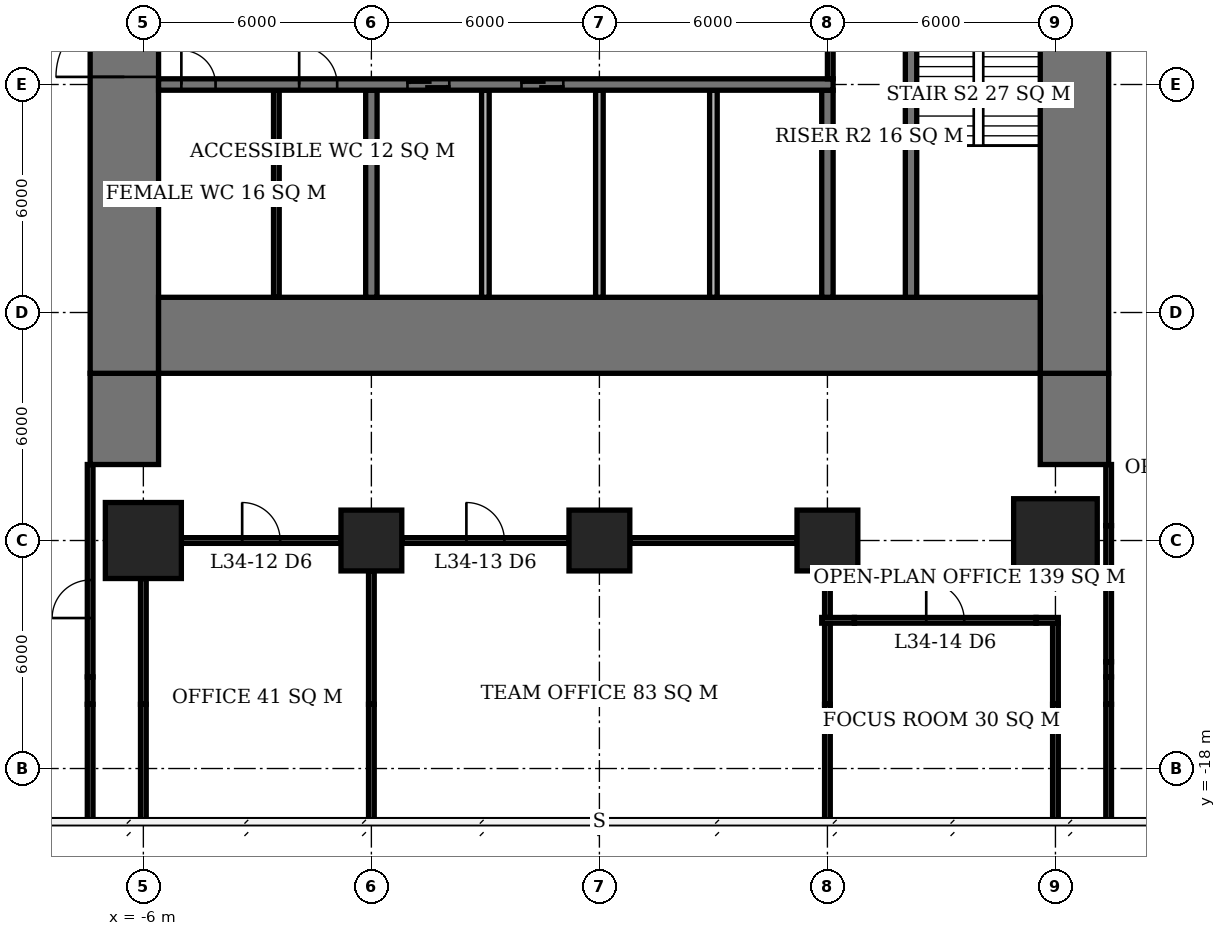
"""IFC4 building model, lengths in metres.
Left out: names, types, materials, properties, quantities, classifications, styles, units other than length and angle.
Written with IfcOpenShell. Run it as: python <this file> out.ifc"""

import sys

from ifc_helpers import new_model, si_unit, direction, frame, frame_2d, origin, origin_2d, place, context, subcontext, project, spatial, rectangle, extrude, element, fill, save


model = new_model("IFC4")
c1 = context("Model", 3, precision=1e-05, world=origin(), true_north=direction((0.0, 1.0)))
c2 = subcontext(c1, "Body", "Model", "MODEL_VIEW")
j1 = project(units=[si_unit("LENGTHUNIT", "METRE"), si_unit("PLANEANGLEUNIT", "RADIAN")], contexts=[c1])
p1 = place(None, origin())
s1 = spatial("IfcSite", under=j1, at=p1, CompositionType="ELEMENT")
p2 = place(p1, origin())
s2 = spatial("IfcBuilding", under=s1, at=p2, CompositionType="ELEMENT")
p3 = place(p2, frame((0.0, 0.0, 140.6)))
s3 = spatial("IfcBuildingStorey", under=s2, at=p3, CompositionType="ELEMENT", Elevation=140.6)
p4 = place(p3, frame((-6.0, -12.0, 0.0), z_axis=(0.0, 0.0, 1.0), x_axis=(1.0, 0.0, 0.0)))
e1 = element("IfcColumn", 1, at=p4, inside=s3, PredefinedType="COLUMN", context=c2, shape_type="SweptSolid", body=[
    extrude(rectangle(XDim=2.0, YDim=2.0, at=origin_2d()), origin(), (0.0, 0.0, 1.0), 3.9),
])
for number, where, z_axis, x_axis in (
    (2, (0.0, -12.0, 0.0), (0.0, 0.0, 1.0), (1.0, 0.0, 0.0)),
    (3, (6.0, -12.0, 0.0), (0.0, 0.0, 1.0), (1.0, 0.0, 0.0)),
    (4, (12.0, -12.0, 0.0), (0.0, 0.0, 1.0), (1.0, 0.0, 0.0)),
):
    element("IfcColumn", number, at=place(p3, frame(where, z_axis=z_axis, x_axis=x_axis)), inside=s3, PredefinedType="COLUMN", context=c2, shape_type="SweptSolid", body=[
        extrude(rectangle(XDim=1.6, YDim=1.6, at=origin_2d()), origin(), (0.0, 0.0, 1.0), 3.9),
    ])
p5 = place(p3, frame((18.0, -12.0, 0.0), z_axis=(0.0, 0.0, 1.0), x_axis=(1.0, 0.0, 0.0)))
e5 = element("IfcColumn", 5, at=p5, inside=s3, PredefinedType="COLUMN", context=c2, shape_type="SweptSolid", body=[
    extrude(rectangle(XDim=2.2, YDim=2.2, at=origin_2d()), origin(), (0.0, 0.0, 1.0), 3.9),
])
p6 = place(p3, frame((-5.6, -6.6, 0.0), z_axis=(0.0, 0.0, 1.0), x_axis=(1.0, 0.0, 0.0)))
e6 = element("IfcWall", 6, at=p6, inside=s3, PredefinedType="SHEAR", context=c2, shape_type="SweptSolid", body=[
    extrude(rectangle(XDim=23.2, YDim=2.0, at=frame_2d((11.6, 0.0))), origin(), (0.0, 0.0, 1.0), 3.9),
])
p7 = place(p3, frame((-6.5, -7.6, 0.0), z_axis=(0.0, 0.0, 1.0), x_axis=(0.0, 1.0, 0.0)))
e7 = element("IfcWall", 7, at=p7, inside=s3, PredefinedType="SHEAR", context=c2, shape_type="SweptSolid", body=[
    extrude(rectangle(XDim=21.2, YDim=1.8, at=frame_2d((10.6, 0.0))), origin(), (0.0, 0.0, 1.0), 3.9),
])
p8 = place(p7, frame((7.8, 0.0, 0.0)))
e8 = element("IfcOpeningElement", 8, at=p8, cuts=e7, PredefinedType="OPENING", context=c2, shape_type="SweptSolid", body=[
    extrude(rectangle(XDim=1.8, YDim=2.4, at=frame_2d((0.9, 1.2))), frame((0.0, 0.91, 0.0), z_axis=(0.0, -1.0, 0.0), x_axis=(1.0, 0.0, 0.0)), (0.0, 0.0, 1.0), 1.82),
])
p9 = place(p3, frame((18.5, -7.6, 0.0), z_axis=(0.0, 0.0, 1.0), x_axis=(0.0, 1.0, 0.0)))
e9 = element("IfcWall", 9, at=p9, inside=s3, PredefinedType="SHEAR", context=c2, shape_type="SweptSolid", body=[
    extrude(rectangle(XDim=21.2, YDim=1.8, at=frame_2d((10.6, 0.0))), origin(), (0.0, 0.0, 1.0), 3.9),
])
p10 = place(p9, frame((9.2, 0.0, 0.0)))
e10 = element("IfcOpeningElement", 10, at=p10, cuts=e9, PredefinedType="OPENING", context=c2, shape_type="SweptSolid", body=[
    extrude(rectangle(XDim=1.8, YDim=2.4, at=frame_2d((0.9, 1.2))), frame((0.0, 0.91, 0.0), z_axis=(0.0, -1.0, 0.0), x_axis=(1.0, 0.0, 0.0)), (0.0, 0.0, 1.0), 1.82),
])
for number, where, z_axis, x_axis in (
    (11, (-6.5, -10.0, 0.0), (0.0, 0.0, 1.0), (0.0, 1.0, 0.0)),
    (12, (18.5, -10.0, 0.0), (0.0, 0.0, 1.0), (0.0, 1.0, 0.0)),
):
    element("IfcWall", number, at=place(p3, frame(where, z_axis=z_axis, x_axis=x_axis)), inside=s3, PredefinedType="SHEAR", context=c2, shape_type="SweptSolid", body=[
        extrude(rectangle(XDim=2.4, YDim=1.8, at=frame_2d((1.2, 0.0))), origin(), (0.0, 0.0, 1.0), 3.9),
    ])
p11 = place(p3, frame((-5.6, 0.0, 0.0), z_axis=(0.0, 0.0, 1.0), x_axis=(1.0, 0.0, 0.0)))
e13 = element("IfcWall", 13, at=p11, inside=s3, PredefinedType="SHEAR", context=c2, shape_type="SweptSolid", body=[
    extrude(rectangle(XDim=17.75, YDim=0.3, at=frame_2d((8.875, 0.0))), origin(), (0.0, 0.0, 1.0), 3.9),
])
p12 = place(p11, frame((0.6, 0.0, 0.0)))
e14 = element("IfcOpeningElement", 14, at=p12, cuts=e13, PredefinedType="OPENING", context=c2, shape_type="SweptSolid", body=[
    extrude(rectangle(XDim=0.9, YDim=2.1, at=frame_2d((0.45, 1.05))), frame((0.0, 0.16, 0.0), z_axis=(0.0, -1.0, 0.0), x_axis=(1.0, 0.0, 0.0)), (0.0, 0.0, 1.0), 0.32),
])
p13 = place(p11, frame((3.7, 0.0, 0.0)))
e15 = element("IfcOpeningElement", 15, at=p13, cuts=e13, PredefinedType="OPENING", context=c2, shape_type="SweptSolid", body=[
    extrude(rectangle(XDim=1.0, YDim=2.1, at=frame_2d((0.5, 1.05))), frame((0.0, 0.16, 0.0), z_axis=(0.0, -1.0, 0.0), x_axis=(1.0, 0.0, 0.0)), (0.0, 0.0, 1.0), 0.32),
])
p14 = place(p11, frame((6.55, 0.0, 0.0)))
e16 = element("IfcOpeningElement", 16, at=p14, cuts=e13, PredefinedType="OPENING", context=c2, shape_type="SweptSolid", body=[
    extrude(rectangle(XDim=1.1, YDim=2.1, at=frame_2d((0.55, 1.05))), frame((0.0, 0.16, 0.0), z_axis=(0.0, -1.0, 0.0), x_axis=(1.0, 0.0, 0.0)), (0.0, 0.0, 1.0), 0.32),
])
p15 = place(p11, frame((9.55, 0.0, 0.0)))
e17 = element("IfcOpeningElement", 17, at=p15, cuts=e13, PredefinedType="OPENING", context=c2, shape_type="SweptSolid", body=[
    extrude(rectangle(XDim=1.1, YDim=2.1, at=frame_2d((0.55, 1.05))), frame((0.0, 0.16, 0.0), z_axis=(0.0, -1.0, 0.0), x_axis=(1.0, 0.0, 0.0)), (0.0, 0.0, 1.0), 0.32),
])
for number, where, z_axis, x_axis in (
    (18, (0.0, -5.6, 0.0), (0.0, 0.0, 1.0), (0.0, 1.0, 0.0)),
    (19, (12.0, -5.6, 0.0), (0.0, 0.0, 1.0), (0.0, 1.0, 0.0)),
):
    element("IfcWall", number, at=place(p3, frame(where, z_axis=z_axis, x_axis=x_axis)), inside=s3, PredefinedType="SHEAR", context=c2, shape_type="SweptSolid", body=[
        extrude(rectangle(XDim=5.45, YDim=0.3, at=frame_2d((2.725, 0.0))), origin(), (0.0, 0.0, 1.0), 3.9),
    ])
p16 = place(p3, frame((14.2, -5.6, 0.0), z_axis=(0.0, 0.0, 1.0), x_axis=(0.0, 1.0, 0.0)))
e20 = element("IfcWall", 20, at=p16, inside=s3, PredefinedType="SHEAR", context=c2, shape_type="SweptSolid", body=[
    extrude(rectangle(XDim=8.45, YDim=0.3, at=frame_2d((4.225, 0.0))), origin(), (0.0, 0.0, 1.0), 3.9),
])
for number, where, z_axis, x_axis in (
    (21, (3.0, -5.6, 0.0), (0.0, 0.0, 1.0), (0.0, 1.0, 0.0)),
    (22, (6.0, -5.6, 0.0), (0.0, 0.0, 1.0), (0.0, 1.0, 0.0)),
    (23, (9.0, -5.6, 0.0), (0.0, 0.0, 1.0), (0.0, 1.0, 0.0)),
):
    element("IfcWall", number, at=place(p3, frame(where, z_axis=z_axis, x_axis=x_axis)), inside=s3, PredefinedType="SOLIDWALL", context=c2, shape_type="SweptSolid", body=[
        extrude(rectangle(XDim=5.45, YDim=0.2, at=frame_2d((2.725, 0.0))), origin(), (0.0, 0.0, 1.0), 3.9),
    ])
p17 = place(p3, frame((-2.5, -5.6, 0.0), z_axis=(0.0, 0.0, 1.0), x_axis=(0.0, 1.0, 0.0)))
e24 = element("IfcWall", 24, at=p17, inside=s3, PredefinedType="PLUMBINGWALL", context=c2, shape_type="SweptSolid", body=[
    extrude(rectangle(XDim=5.45, YDim=0.15, at=frame_2d((2.725, 0.0))), origin(), (0.0, 0.0, 1.0), 3.65),
])
p18 = place(p3, frame((11.85, -14.1, 0.0), z_axis=(0.0, 0.0, 1.0), x_axis=(1.0, 0.0, 0.0)))
e25 = element("IfcWall", 25, at=p18, inside=s3, PredefinedType="PARTITIONING", context=c2, shape_type="SweptSolid", body=[
    extrude(rectangle(XDim=0.86, YDim=0.15, at=frame_2d((0.43, 0.0))), origin(), (0.0, 0.0, 1.0), 2.65),
])
p19 = place(p3, frame((12.71, -14.1, 0.0), z_axis=(0.0, 0.0, 1.0), x_axis=(1.0, 0.0, 0.0)))
e26 = element("IfcWall", 26, at=p19, inside=s3, PredefinedType="PARTITIONING", context=c2, shape_type="SweptSolid", body=[
    extrude(rectangle(XDim=4.78, YDim=0.15, at=frame_2d((2.39, 0.0))), origin(), (0.0, 0.0, 1.0), 3.65),
])
p20 = place(p19, frame((1.89, 0.0, 0.0)))
e27 = element("IfcOpeningElement", 27, at=p20, cuts=e26, PredefinedType="OPENING", context=c2, shape_type="SweptSolid", body=[
    extrude(rectangle(XDim=1.0, YDim=2.1, at=frame_2d((0.5, 1.05))), frame((0.0, 0.085, 0.0), z_axis=(0.0, -1.0, 0.0), x_axis=(1.0, 0.0, 0.0)), (0.0, 0.0, 1.0), 0.17),
])
p21 = place(p3, frame((17.49, -14.1, 0.0), z_axis=(0.0, 0.0, 1.0), x_axis=(1.0, 0.0, 0.0)))
e28 = element("IfcWall", 28, at=p21, inside=s3, PredefinedType="PARTITIONING", context=c2, shape_type="SweptSolid", body=[
    extrude(rectangle(XDim=0.585, YDim=0.15, at=frame_2d((0.292, 0.0))), origin(), (0.0, 0.0, 1.0), 2.65),
])
p22 = place(p3, frame((-5.0, -12.0, 0.0), z_axis=(0.0, 0.0, 1.0), x_axis=(1.0, 0.0, 0.0)))
e29 = element("IfcWall", 29, at=p22, inside=s3, PredefinedType="PARTITIONING", context=c2, shape_type="SweptSolid", body=[
    extrude(rectangle(XDim=4.2, YDim=0.15, at=frame_2d((2.1, 0.0))), origin(), (0.0, 0.0, 1.0), 3.65),
])
p23 = place(p22, frame((1.6, 0.0, 0.0)))
e30 = element("IfcOpeningElement", 30, at=p23, cuts=e29, PredefinedType="OPENING", context=c2, shape_type="SweptSolid", body=[
    extrude(rectangle(XDim=1.0, YDim=2.1, at=frame_2d((0.5, 1.05))), frame((0.0, 0.085, 0.0), z_axis=(0.0, -1.0, 0.0), x_axis=(1.0, 0.0, 0.0)), (0.0, 0.0, 1.0), 0.17),
])
p24 = place(p3, frame((0.8, -12.0, 0.0), z_axis=(0.0, 0.0, 1.0), x_axis=(1.0, 0.0, 0.0)))
e31 = element("IfcWall", 31, at=p24, inside=s3, PredefinedType="PARTITIONING", context=c2, shape_type="SweptSolid", body=[
    extrude(rectangle(XDim=4.4, YDim=0.15, at=frame_2d((2.2, 0.0))), origin(), (0.0, 0.0, 1.0), 3.65),
])
p25 = place(p24, frame((1.7, 0.0, 0.0)))
e32 = element("IfcOpeningElement", 32, at=p25, cuts=e31, PredefinedType="OPENING", context=c2, shape_type="SweptSolid", body=[
    extrude(rectangle(XDim=1.0, YDim=2.1, at=frame_2d((0.5, 1.05))), frame((0.0, 0.085, 0.0), z_axis=(0.0, -1.0, 0.0), x_axis=(1.0, 0.0, 0.0)), (0.0, 0.0, 1.0), 0.17),
])
p26 = place(p3, frame((6.8, -12.0, 0.0), z_axis=(0.0, 0.0, 1.0), x_axis=(1.0, 0.0, 0.0)))
e33 = element("IfcWall", 33, at=p26, inside=s3, PredefinedType="PARTITIONING", context=c2, shape_type="SweptSolid", body=[
    extrude(rectangle(XDim=4.4, YDim=0.15, at=frame_2d((2.2, 0.0))), origin(), (0.0, 0.0, 1.0), 3.65),
])
p27 = place(p3, frame((-6.0, -19.4, 0.0), z_axis=(0.0, 0.0, 1.0), x_axis=(0.0, 1.0, 0.0)))
e34 = element("IfcWall", 34, at=p27, inside=s3, PredefinedType="PARTITIONING", context=c2, shape_type="SweptSolid", body=[
    extrude(rectangle(XDim=3.09, YDim=0.15, at=frame_2d((1.545, 0.0))), origin(), (0.0, 0.0, 1.0), 3.65),
])
p28 = place(p3, frame((-6.0, -16.31, 0.0), z_axis=(0.0, 0.0, 1.0), x_axis=(0.0, 1.0, 0.0)))
e35 = element("IfcWall", 35, at=p28, inside=s3, PredefinedType="PARTITIONING", context=c2, shape_type="SweptSolid", body=[
    extrude(rectangle(XDim=3.31, YDim=0.15, at=frame_2d((1.655, 0.0))), origin(), (0.0, 0.0, 1.0), 2.65),
])
p29 = place(p3, frame((0.0, -19.4, 0.0), z_axis=(0.0, 0.0, 1.0), x_axis=(0.0, 1.0, 0.0)))
e36 = element("IfcWall", 36, at=p29, inside=s3, PredefinedType="PARTITIONING", context=c2, shape_type="SweptSolid", body=[
    extrude(rectangle(XDim=3.09, YDim=0.15, at=frame_2d((1.545, 0.0))), origin(), (0.0, 0.0, 1.0), 3.65),
])
p30 = place(p3, frame((0.0, -16.31, 0.0), z_axis=(0.0, 0.0, 1.0), x_axis=(0.0, 1.0, 0.0)))
e37 = element("IfcWall", 37, at=p30, inside=s3, PredefinedType="PARTITIONING", context=c2, shape_type="SweptSolid", body=[
    extrude(rectangle(XDim=3.51, YDim=0.15, at=frame_2d((1.755, 0.0))), origin(), (0.0, 0.0, 1.0), 2.65),
])
p31 = place(p3, frame((12.0, -19.4, 0.0), z_axis=(0.0, 0.0, 1.0), x_axis=(0.0, 1.0, 0.0)))
e38 = element("IfcWall", 38, at=p31, inside=s3, PredefinedType="PARTITIONING", context=c2, shape_type="SweptSolid", body=[
    extrude(rectangle(XDim=3.09, YDim=0.15, at=frame_2d((1.545, 0.0))), origin(), (0.0, 0.0, 1.0), 3.65),
])
p32 = place(p3, frame((12.0, -16.31, 0.0), z_axis=(0.0, 0.0, 1.0), x_axis=(0.0, 1.0, 0.0)))
e39 = element("IfcWall", 39, at=p32, inside=s3, PredefinedType="PARTITIONING", context=c2, shape_type="SweptSolid", body=[
    extrude(rectangle(XDim=2.135, YDim=0.15, at=frame_2d((1.067, 0.0))), origin(), (0.0, 0.0, 1.0), 2.65),
])
p33 = place(p3, frame((12.0, -14.025, 0.0), z_axis=(0.0, 0.0, 1.0), x_axis=(0.0, 1.0, 0.0)))
e40 = element("IfcWall", 40, at=p33, inside=s3, PredefinedType="PARTITIONING", context=c2, shape_type="SweptSolid", body=[
    extrude(rectangle(XDim=1.225, YDim=0.15, at=frame_2d((0.612, 0.0))), origin(), (0.0, 0.0, 1.0), 2.65),
])
p34 = place(p3, frame((18.0, -19.4, 0.0), z_axis=(0.0, 0.0, 1.0), x_axis=(0.0, 1.0, 0.0)))
e41 = element("IfcWall", 41, at=p34, inside=s3, PredefinedType="PARTITIONING", context=c2, shape_type="SweptSolid", body=[
    extrude(rectangle(XDim=3.09, YDim=0.15, at=frame_2d((1.545, 0.0))), origin(), (0.0, 0.0, 1.0), 3.65),
])
p35 = place(p3, frame((18.0, -16.31, 0.0), z_axis=(0.0, 0.0, 1.0), x_axis=(0.0, 1.0, 0.0)))
e42 = element("IfcWall", 42, at=p35, inside=s3, PredefinedType="PARTITIONING", context=c2, shape_type="SweptSolid", body=[
    extrude(rectangle(XDim=2.135, YDim=0.15, at=frame_2d((1.067, 0.0))), origin(), (0.0, 0.0, 1.0), 2.65),
])
p36 = place(p3, frame((-7.4, -19.4, 0.0), z_axis=(0.0, 0.0, 1.0), x_axis=(0.0, 1.0, 0.0)))
e43 = element("IfcWall", 43, at=p36, inside=s3, PredefinedType="PARTITIONING", context=c2, shape_type="SweptSolid", body=[
    extrude(rectangle(XDim=3.09, YDim=0.15, at=frame_2d((1.545, 0.0))), origin(), (0.0, 0.0, 1.0), 3.65),
])
p37 = place(p3, frame((-7.4, -16.31, 0.0), z_axis=(0.0, 0.0, 1.0), x_axis=(0.0, 1.0, 0.0)))
e44 = element("IfcWall", 44, at=p37, inside=s3, PredefinedType="PARTITIONING", context=c2, shape_type="SweptSolid", body=[
    extrude(rectangle(XDim=0.72, YDim=0.15, at=frame_2d((0.36, 0.0))), origin(), (0.0, 0.0, 1.0), 2.65),
])
p38 = place(p3, frame((-7.4, -15.59, 0.0), z_axis=(0.0, 0.0, 1.0), x_axis=(0.0, 1.0, 0.0)))
e45 = element("IfcWall", 45, at=p38, inside=s3, PredefinedType="PARTITIONING", context=c2, shape_type="SweptSolid", body=[
    extrude(rectangle(XDim=5.59, YDim=0.15, at=frame_2d((2.795, 0.0))), origin(), (0.0, 0.0, 1.0), 3.65),
])
p39 = place(p38, frame((1.55, 0.0, 0.0)))
e46 = element("IfcOpeningElement", 46, at=p39, cuts=e45, PredefinedType="OPENING", context=c2, shape_type="SweptSolid", body=[
    extrude(rectangle(XDim=1.0, YDim=2.1, at=frame_2d((0.5, 1.05))), frame((0.0, 0.085, 0.0), z_axis=(0.0, -1.0, 0.0), x_axis=(1.0, 0.0, 0.0)), (0.0, 0.0, 1.0), 0.17),
])
p40 = place(p3, frame((19.4, -19.4, 0.0), z_axis=(0.0, 0.0, 1.0), x_axis=(0.0, 1.0, 0.0)))
e47 = element("IfcWall", 47, at=p40, inside=s3, PredefinedType="PARTITIONING", context=c2, shape_type="SweptSolid", body=[
    extrude(rectangle(XDim=3.09, YDim=0.15, at=frame_2d((1.545, 0.0))), origin(), (0.0, 0.0, 1.0), 3.65),
])
p41 = place(p3, frame((19.4, -16.31, 0.0), z_axis=(0.0, 0.0, 1.0), x_axis=(0.0, 1.0, 0.0)))
e48 = element("IfcWall", 48, at=p41, inside=s3, PredefinedType="PARTITIONING", context=c2, shape_type="SweptSolid", body=[
    extrude(rectangle(XDim=0.72, YDim=0.15, at=frame_2d((0.36, 0.0))), origin(), (0.0, 0.0, 1.0), 2.65),
])
p42 = place(p3, frame((19.4, -15.59, 0.0), z_axis=(0.0, 0.0, 1.0), x_axis=(0.0, 1.0, 0.0)))
e49 = element("IfcWall", 49, at=p42, inside=s3, PredefinedType="PARTITIONING", context=c2, shape_type="SweptSolid", body=[
    extrude(rectangle(XDim=0.398, YDim=0.15, at=frame_2d((0.199, 0.0))), origin(), (0.0, 0.0, 1.0), 3.65),
])
p43 = place(p3, frame((19.4, -15.192, 0.0), z_axis=(0.0, 0.0, 1.0), x_axis=(0.0, 1.0, 0.0)))
e50 = element("IfcWall", 50, at=p43, inside=s3, PredefinedType="PARTITIONING", context=c2, shape_type="SweptSolid", body=[
    extrude(rectangle(XDim=3.584, YDim=0.15, at=frame_2d((1.792, 0.0))), origin(), (0.0, 0.0, 1.0), 2.65),
])
p44 = place(p3, frame((19.4, -11.608, 0.0), z_axis=(0.0, 0.0, 1.0), x_axis=(0.0, 1.0, 0.0)))
e51 = element("IfcWall", 51, at=p44, inside=s3, PredefinedType="PARTITIONING", context=c2, shape_type="SweptSolid", body=[
    extrude(rectangle(XDim=1.608, YDim=0.15, at=frame_2d((0.804, 0.0))), origin(), (0.0, 0.0, 1.0), 3.65),
])
p45 = place(p3, frame((12.075, 0.15, 0.0), z_axis=(0.0, 0.0, 1.0), x_axis=(0.0, 1.0, 0.0)))
e52 = element("IfcWall", 52, at=p45, inside=s3, PredefinedType="PARTITIONING", context=c2, shape_type="SweptSolid", body=[
    extrude(rectangle(XDim=3.0, YDim=0.15, at=frame_2d((1.5, 0.0))), origin(), (0.0, 0.0, 1.0), 3.65),
])
p46 = place(p8, origin())
e53 = element("IfcDoor", 53, at=p46, inside=s3, OperationType="DOUBLE_DOOR_SINGLE_SWING", PredefinedType="DOOR", context=c2, shape_type="SweptSolid", body=[
    extrude(rectangle(XDim=1.8, YDim=2.4, at=frame_2d((0.9, 1.2))), frame((0.0, 0.025, 0.0), z_axis=(0.0, -1.0, 0.0), x_axis=(1.0, 0.0, 0.0)), (0.0, 0.0, 1.0), 0.05),
])
fill(e8, e53)
p47 = place(p12, origin())
e54 = element("IfcDoor", 54, at=p47, inside=s3, OperationType="SINGLE_SWING_LEFT", PredefinedType="DOOR", context=c2, shape_type="SweptSolid", body=[
    extrude(rectangle(XDim=0.9, YDim=2.1, at=frame_2d((0.45, 1.05))), frame((0.0, 0.025, 0.0), z_axis=(0.0, -1.0, 0.0), x_axis=(1.0, 0.0, 0.0)), (0.0, 0.0, 1.0), 0.05),
])
fill(e14, e54)
p48 = place(p13, origin())
e55 = element("IfcDoor", 55, at=p48, inside=s3, OperationType="SINGLE_SWING_LEFT", PredefinedType="DOOR", context=c2, shape_type="SweptSolid", body=[
    extrude(rectangle(XDim=1.0, YDim=2.1, at=frame_2d((0.5, 1.05))), frame((0.0, 0.025, 0.0), z_axis=(0.0, -1.0, 0.0), x_axis=(1.0, 0.0, 0.0)), (0.0, 0.0, 1.0), 0.05),
])
fill(e15, e55)
p49 = place(p14, origin())
e56 = element("IfcDoor", 56, at=p49, inside=s3, OperationType="DOUBLE_DOOR_SLIDING", PredefinedType="USERDEFINED", context=c2, shape_type="SweptSolid", body=[
    extrude(rectangle(XDim=1.1, YDim=2.1, at=frame_2d((0.55, 1.05))), frame((0.0, 0.025, 0.0), z_axis=(0.0, -1.0, 0.0), x_axis=(1.0, 0.0, 0.0)), (0.0, 0.0, 1.0), 0.05),
])
fill(e16, e56)
p50 = place(p15, origin())
e57 = element("IfcDoor", 57, at=p50, inside=s3, OperationType="DOUBLE_DOOR_SLIDING", PredefinedType="USERDEFINED", context=c2, shape_type="SweptSolid", body=[
    extrude(rectangle(XDim=1.1, YDim=2.1, at=frame_2d((0.55, 1.05))), frame((0.0, 0.025, 0.0), z_axis=(0.0, -1.0, 0.0), x_axis=(1.0, 0.0, 0.0)), (0.0, 0.0, 1.0), 0.05),
])
fill(e17, e57)
p51 = place(p23, origin())
e58 = element("IfcDoor", 58, at=p51, inside=s3, OperationType="SINGLE_SWING_LEFT", PredefinedType="DOOR", context=c2, shape_type="SweptSolid", body=[
    extrude(rectangle(XDim=1.0, YDim=2.1, at=frame_2d((0.5, 1.05))), frame((0.0, 0.025, 0.0), z_axis=(0.0, -1.0, 0.0), x_axis=(1.0, 0.0, 0.0)), (0.0, 0.0, 1.0), 0.05),
])
fill(e30, e58)
p52 = place(p25, origin())
e59 = element("IfcDoor", 59, at=p52, inside=s3, OperationType="SINGLE_SWING_LEFT", PredefinedType="DOOR", context=c2, shape_type="SweptSolid", body=[
    extrude(rectangle(XDim=1.0, YDim=2.1, at=frame_2d((0.5, 1.05))), frame((0.0, 0.025, 0.0), z_axis=(0.0, -1.0, 0.0), x_axis=(1.0, 0.0, 0.0)), (0.0, 0.0, 1.0), 0.05),
])
fill(e32, e59)
p53 = place(p20, origin())
e60 = element("IfcDoor", 60, at=p53, inside=s3, OperationType="SINGLE_SWING_LEFT", PredefinedType="DOOR", context=c2, shape_type="SweptSolid", body=[
    extrude(rectangle(XDim=1.0, YDim=2.1, at=frame_2d((0.5, 1.05))), frame((0.0, 0.025, 0.0), z_axis=(0.0, -1.0, 0.0), x_axis=(1.0, 0.0, 0.0)), (0.0, 0.0, 1.0), 0.05),
])
fill(e27, e60)
p54 = place(p39, origin())
e61 = element("IfcDoor", 61, at=p54, inside=s3, OperationType="SINGLE_SWING_LEFT", PredefinedType="DOOR", context=c2, shape_type="SweptSolid", body=[
    extrude(rectangle(XDim=1.0, YDim=2.1, at=frame_2d((0.5, 1.05))), frame((0.0, 0.025, 0.0), z_axis=(0.0, -1.0, 0.0), x_axis=(1.0, 0.0, 0.0)), (0.0, 0.0, 1.0), 0.05),
])
fill(e46, e61)
save(model, sys.argv[1])
